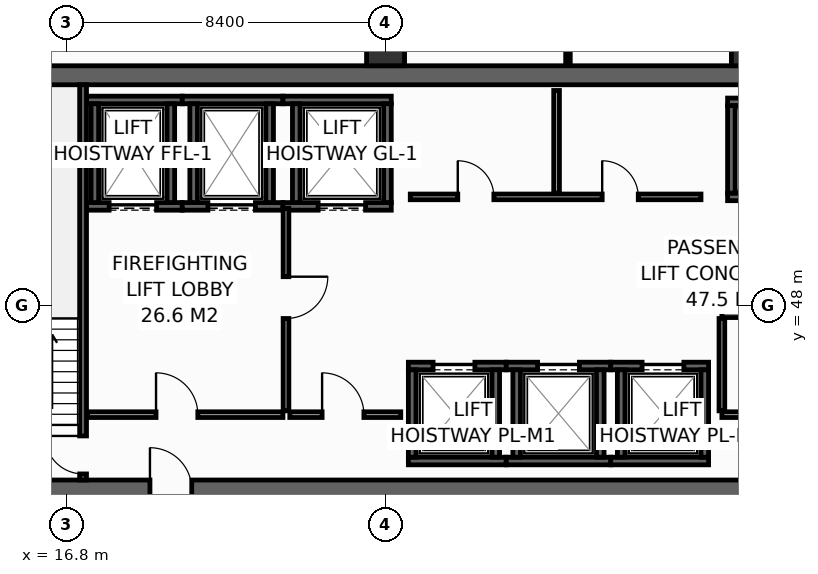
"""IFC4 building model, lengths in metres.
Left out: names, types, materials, properties, quantities, classifications, styles, units other than length and angle.
Written with IfcOpenShell. Run it as: python <this file> out.ifc"""

import sys

from ifc_helpers import new_model, si_unit, direction, frame, frame_2d, origin, origin_2d, place, context, subcontext, project, spatial, rectangle, hollow_rectangle, extrude, element, fill, save


model = new_model("IFC4")
c1 = context("Model", 3, precision=1e-05, world=origin(), true_north=direction((0.0, 1.0)))
c2 = subcontext(c1, "Body", "Model", "MODEL_VIEW")
j1 = project(units=[si_unit("LENGTHUNIT", "METRE"), si_unit("PLANEANGLEUNIT", "RADIAN")], contexts=[c1])
p1 = place(None, origin())
s1 = spatial("IfcSite", under=j1, at=p1, CompositionType="ELEMENT")
p2 = place(p1, origin())
s2 = spatial("IfcBuilding", under=s1, at=p2, CompositionType="ELEMENT")
p3 = place(p2, frame((0.0, 0.0, 179.0)))
s3 = spatial("IfcBuildingStorey", under=s2, at=p3, CompositionType="ELEMENT", Elevation=179.0)
p4 = place(p3, frame((13.6, 43.15, 0.0), z_axis=(0.0, 0.0, 1.0), x_axis=(1.0, 0.0, 0.0)))
e1 = element("IfcWall", 1, at=p4, inside=s3, PredefinedType="SHEAR", context=c2, shape_type="SweptSolid", body=[
    extrude(rectangle(XDim=32.7, YDim=0.5, at=frame_2d((16.35, 0.0))), origin(), (0.0, 0.0, 1.0), 3.55),
])
p5 = place(p4, frame((5.4, 0.0, 0.0)))
e2 = element("IfcOpeningElement", 2, at=p5, cuts=e1, PredefinedType="OPENING", context=c2, shape_type="SweptSolid", body=[
    extrude(rectangle(XDim=1.1, YDim=2.15, at=frame_2d((0.55, 1.075))), frame((0.0, 0.26, 0.0), z_axis=(0.0, -1.0, 0.0), x_axis=(1.0, 0.0, 0.0)), (0.0, 0.0, 1.0), 0.52),
])
p6 = place(p4, frame((25.6, 0.0, 0.0)))
e3 = element("IfcOpeningElement", 3, at=p6, cuts=e1, PredefinedType="OPENING", context=c2, shape_type="SweptSolid", body=[
    extrude(rectangle(XDim=1.1, YDim=2.15, at=frame_2d((0.55, 1.075))), frame((0.0, 0.26, 0.0), z_axis=(0.0, -1.0, 0.0), x_axis=(1.0, 0.0, 0.0)), (0.0, 0.0, 1.0), 0.52),
])
p7 = place(p3, frame((13.6, 54.05, 0.0), z_axis=(0.0, 0.0, 1.0), x_axis=(1.0, 0.0, 0.0)))
e4 = element("IfcWall", 4, at=p7, inside=s3, PredefinedType="SHEAR", context=c2, shape_type="SweptSolid", body=[
    extrude(rectangle(XDim=32.7, YDim=0.5, at=frame_2d((16.35, 0.0))), origin(), (0.0, 0.0, 1.0), 3.55),
])
for number, where, z_axis, x_axis in (
    (5, (25.2, 54.8, 0.0), (0.0, 0.0, 1.0), (1.0, 0.0, 0.0)),
    (6, (34.8, 54.8, 0.0), (0.0, 0.0, 1.0), (1.0, 0.0, 0.0)),
):
    element("IfcColumn", number, at=place(p3, frame(where, z_axis=z_axis, x_axis=x_axis)), inside=s3, PredefinedType="COLUMN", context=c2, shape_type="SweptSolid", body=[
        extrude(hollow_rectangle(XDim=1.0, YDim=1.0, WallThickness=0.045, at=origin_2d()), origin(), (0.0, 0.0, 1.0), 3.8),
    ])
p8 = place(p3, frame((17.33, 50.6, 0.0), z_axis=(0.0, 0.0, 1.0), x_axis=(1.0, 0.0, 0.0)))
e7 = element("IfcWall", 7, at=p8, inside=s3, PredefinedType="SHEAR", context=c2, shape_type="SweptSolid", body=[
    extrude(rectangle(XDim=2.52, YDim=0.2, at=frame_2d((1.26, 0.0))), origin(), (0.0, 0.0, 1.0), 3.55),
])
p9 = place(p8, frame((0.595, 0.0, 0.0)))
e8 = element("IfcOpeningElement", 8, at=p9, cuts=e7, PredefinedType="OPENING", context=c2, shape_type="SweptSolid", body=[
    extrude(rectangle(XDim=1.25, YDim=2.3, at=frame_2d((0.625, 1.15))), frame((0.0, 0.11, 0.0), z_axis=(0.0, -1.0, 0.0), x_axis=(1.0, 0.0, 0.0)), (0.0, 0.0, 1.0), 0.22),
])
p10 = place(p3, frame((17.33, 53.4, 0.0), z_axis=(0.0, 0.0, 1.0), x_axis=(1.0, 0.0, 0.0)))
e9 = element("IfcWall", 9, at=p10, inside=s3, PredefinedType="SHEAR", context=c2, shape_type="SweptSolid", body=[
    extrude(rectangle(XDim=2.52, YDim=0.2, at=frame_2d((1.26, 0.0))), origin(), (0.0, 0.0, 1.0), 3.55),
])
for number, where, z_axis, x_axis in (
    (10, (17.55, 50.7, 0.0), (0.0, 0.0, 1.0), (0.0, 1.0, 0.0)),
    (11, (19.55, 50.7, 0.0), (0.0, 0.0, 1.0), (0.0, 1.0, 0.0)),
):
    element("IfcWall", number, at=place(p3, frame(where, z_axis=z_axis, x_axis=x_axis)), inside=s3, PredefinedType="SHEAR", context=c2, shape_type="SweptSolid", body=[
        extrude(rectangle(XDim=2.6, YDim=0.2, at=frame_2d((1.3, 0.0))), origin(), (0.0, 0.0, 1.0), 3.55),
    ])
p11 = place(p3, frame((19.85, 50.6, 0.0), z_axis=(0.0, 0.0, 1.0), x_axis=(1.0, 0.0, 0.0)))
e12 = element("IfcWall", 12, at=p11, inside=s3, PredefinedType="SHEAR", context=c2, shape_type="SweptSolid", body=[
    extrude(rectangle(XDim=2.65, YDim=0.2, at=frame_2d((1.325, 0.0))), origin(), (0.0, 0.0, 1.0), 3.55),
])
p12 = place(p11, frame((0.675, 0.0, 0.0)))
e13 = element("IfcOpeningElement", 13, at=p12, cuts=e12, PredefinedType="OPENING", context=c2, shape_type="SweptSolid", body=[
    extrude(rectangle(XDim=1.25, YDim=2.3, at=frame_2d((0.625, 1.15))), frame((0.0, 0.11, 0.0), z_axis=(0.0, -1.0, 0.0), x_axis=(1.0, 0.0, 0.0)), (0.0, 0.0, 1.0), 0.22),
])
p13 = place(p3, frame((19.85, 53.4, 0.0), z_axis=(0.0, 0.0, 1.0), x_axis=(1.0, 0.0, 0.0)))
e14 = element("IfcWall", 14, at=p13, inside=s3, PredefinedType="SHEAR", context=c2, shape_type="SweptSolid", body=[
    extrude(rectangle(XDim=2.65, YDim=0.2, at=frame_2d((1.325, 0.0))), origin(), (0.0, 0.0, 1.0), 3.55),
])
for number, where, z_axis, x_axis in (
    (15, (20.15, 50.7, 0.0), (0.0, 0.0, 1.0), (0.0, 1.0, 0.0)),
    (16, (22.15, 50.7, 0.0), (0.0, 0.0, 1.0), (0.0, 1.0, 0.0)),
):
    element("IfcWall", number, at=place(p3, frame(where, z_axis=z_axis, x_axis=x_axis)), inside=s3, PredefinedType="SHEAR", context=c2, shape_type="SweptSolid", body=[
        extrude(rectangle(XDim=2.6, YDim=0.2, at=frame_2d((1.3, 0.0))), origin(), (0.0, 0.0, 1.0), 3.55),
    ])
p14 = place(p3, frame((22.5, 50.6, 0.0), z_axis=(0.0, 0.0, 1.0), x_axis=(1.0, 0.0, 0.0)))
e17 = element("IfcWall", 17, at=p14, inside=s3, PredefinedType="SHEAR", context=c2, shape_type="SweptSolid", body=[
    extrude(rectangle(XDim=2.85, YDim=0.2, at=frame_2d((1.425, 0.0))), origin(), (0.0, 0.0, 1.0), 3.55),
])
p15 = place(p14, frame((0.925, 0.0, 0.0)))
e18 = element("IfcOpeningElement", 18, at=p15, cuts=e17, PredefinedType="OPENING", context=c2, shape_type="SweptSolid", body=[
    extrude(rectangle(XDim=1.25, YDim=2.3, at=frame_2d((0.625, 1.15))), frame((0.0, 0.11, 0.0), z_axis=(0.0, -1.0, 0.0), x_axis=(1.0, 0.0, 0.0)), (0.0, 0.0, 1.0), 0.22),
])
p16 = place(p3, frame((22.5, 53.4, 0.0), z_axis=(0.0, 0.0, 1.0), x_axis=(1.0, 0.0, 0.0)))
e19 = element("IfcWall", 19, at=p16, inside=s3, PredefinedType="SHEAR", context=c2, shape_type="SweptSolid", body=[
    extrude(rectangle(XDim=2.85, YDim=0.2, at=frame_2d((1.425, 0.0))), origin(), (0.0, 0.0, 1.0), 3.55),
])
for number, where, z_axis, x_axis in (
    (20, (22.85, 50.7, 0.0), (0.0, 0.0, 1.0), (0.0, 1.0, 0.0)),
    (21, (25.25, 50.7, 0.0), (0.0, 0.0, 1.0), (0.0, 1.0, 0.0)),
):
    element("IfcWall", number, at=place(p3, frame(where, z_axis=z_axis, x_axis=x_axis)), inside=s3, PredefinedType="SHEAR", context=c2, shape_type="SweptSolid", body=[
        extrude(rectangle(XDim=2.6, YDim=0.2, at=frame_2d((1.3, 0.0))), origin(), (0.0, 0.0, 1.0), 3.55),
    ])
p17 = place(p3, frame((25.8, 43.9, 0.0), z_axis=(0.0, 0.0, 1.0), x_axis=(1.0, 0.0, 0.0)))
e22 = element("IfcWall", 22, at=p17, inside=s3, PredefinedType="SHEAR", context=c2, shape_type="SweptSolid", body=[
    extrude(rectangle(XDim=2.575, YDim=0.2, at=frame_2d((1.288, 0.0))), origin(), (0.0, 0.0, 1.0), 3.55),
])
p18 = place(p3, frame((25.8, 46.4, 0.0), z_axis=(0.0, 0.0, 1.0), x_axis=(1.0, 0.0, 0.0)))
e23 = element("IfcWall", 23, at=p18, inside=s3, PredefinedType="SHEAR", context=c2, shape_type="SweptSolid", body=[
    extrude(rectangle(XDim=2.575, YDim=0.2, at=frame_2d((1.288, 0.0))), origin(), (0.0, 0.0, 1.0), 3.55),
])
p19 = place(p18, frame((0.65, 0.0, 0.0)))
e24 = element("IfcOpeningElement", 24, at=p19, cuts=e23, PredefinedType="OPENING", context=c2, shape_type="SweptSolid", body=[
    extrude(rectangle(XDim=1.1, YDim=2.2, at=frame_2d((0.55, 1.1))), frame((0.0, 0.11, 0.0), z_axis=(0.0, -1.0, 0.0), x_axis=(1.0, 0.0, 0.0)), (0.0, 0.0, 1.0), 0.22),
])
for number, where, z_axis, x_axis in (
    (25, (25.9, 44.0, 0.0), (0.0, 0.0, 1.0), (0.0, 1.0, 0.0)),
    (26, (28.1, 44.0, 0.0), (0.0, 0.0, 1.0), (0.0, 1.0, 0.0)),
):
    element("IfcWall", number, at=place(p3, frame(where, z_axis=z_axis, x_axis=x_axis)), inside=s3, PredefinedType="SHEAR", context=c2, shape_type="SweptSolid", body=[
        extrude(rectangle(XDim=2.3, YDim=0.2, at=frame_2d((1.15, 0.0))), origin(), (0.0, 0.0, 1.0), 3.55),
    ])
p20 = place(p3, frame((28.375, 43.9, 0.0), z_axis=(0.0, 0.0, 1.0), x_axis=(1.0, 0.0, 0.0)))
e27 = element("IfcWall", 27, at=p20, inside=s3, PredefinedType="SHEAR", context=c2, shape_type="SweptSolid", body=[
    extrude(rectangle(XDim=2.75, YDim=0.2, at=frame_2d((1.375, 0.0))), origin(), (0.0, 0.0, 1.0), 3.55),
])
p21 = place(p3, frame((28.375, 46.4, 0.0), z_axis=(0.0, 0.0, 1.0), x_axis=(1.0, 0.0, 0.0)))
e28 = element("IfcWall", 28, at=p21, inside=s3, PredefinedType="SHEAR", context=c2, shape_type="SweptSolid", body=[
    extrude(rectangle(XDim=2.75, YDim=0.2, at=frame_2d((1.375, 0.0))), origin(), (0.0, 0.0, 1.0), 3.55),
])
p22 = place(p21, frame((0.825, 0.0, 0.0)))
e29 = element("IfcOpeningElement", 29, at=p22, cuts=e28, PredefinedType="OPENING", context=c2, shape_type="SweptSolid", body=[
    extrude(rectangle(XDim=1.1, YDim=2.2, at=frame_2d((0.55, 1.1))), frame((0.0, 0.11, 0.0), z_axis=(0.0, -1.0, 0.0), x_axis=(1.0, 0.0, 0.0)), (0.0, 0.0, 1.0), 0.22),
])
for number, where, z_axis, x_axis in (
    (30, (28.65, 44.0, 0.0), (0.0, 0.0, 1.0), (0.0, 1.0, 0.0)),
    (31, (30.85, 44.0, 0.0), (0.0, 0.0, 1.0), (0.0, 1.0, 0.0)),
):
    element("IfcWall", number, at=place(p3, frame(where, z_axis=z_axis, x_axis=x_axis)), inside=s3, PredefinedType="SHEAR", context=c2, shape_type="SweptSolid", body=[
        extrude(rectangle(XDim=2.3, YDim=0.2, at=frame_2d((1.15, 0.0))), origin(), (0.0, 0.0, 1.0), 3.55),
    ])
p23 = place(p3, frame((31.125, 43.9, 0.0), z_axis=(0.0, 0.0, 1.0), x_axis=(1.0, 0.0, 0.0)))
e32 = element("IfcWall", 32, at=p23, inside=s3, PredefinedType="SHEAR", context=c2, shape_type="SweptSolid", body=[
    extrude(rectangle(XDim=2.575, YDim=0.2, at=frame_2d((1.288, 0.0))), origin(), (0.0, 0.0, 1.0), 3.55),
])
p24 = place(p3, frame((31.125, 46.4, 0.0), z_axis=(0.0, 0.0, 1.0), x_axis=(1.0, 0.0, 0.0)))
e33 = element("IfcWall", 33, at=p24, inside=s3, PredefinedType="SHEAR", context=c2, shape_type="SweptSolid", body=[
    extrude(rectangle(XDim=2.575, YDim=0.2, at=frame_2d((1.288, 0.0))), origin(), (0.0, 0.0, 1.0), 3.55),
])
p25 = place(p24, frame((0.825, 0.0, 0.0)))
e34 = element("IfcOpeningElement", 34, at=p25, cuts=e33, PredefinedType="OPENING", context=c2, shape_type="SweptSolid", body=[
    extrude(rectangle(XDim=1.1, YDim=2.2, at=frame_2d((0.55, 1.1))), frame((0.0, 0.11, 0.0), z_axis=(0.0, -1.0, 0.0), x_axis=(1.0, 0.0, 0.0)), (0.0, 0.0, 1.0), 0.22),
])
for number, where, z_axis, x_axis in (
    (35, (31.4, 44.0, 0.0), (0.0, 0.0, 1.0), (0.0, 1.0, 0.0)),
    (36, (33.6, 44.0, 0.0), (0.0, 0.0, 1.0), (0.0, 1.0, 0.0)),
):
    element("IfcWall", number, at=place(p3, frame(where, z_axis=z_axis, x_axis=x_axis)), inside=s3, PredefinedType="SHEAR", context=c2, shape_type="SweptSolid", body=[
        extrude(rectangle(XDim=2.3, YDim=0.2, at=frame_2d((1.15, 0.0))), origin(), (0.0, 0.0, 1.0), 3.55),
    ])
for number, where, z_axis, x_axis in (
    (37, (34.2, 50.85, 0.0), (0.0, 0.0, 1.0), (1.0, 0.0, 0.0)),
    (38, (34.2, 53.35, 0.0), (0.0, 0.0, 1.0), (1.0, 0.0, 0.0)),
):
    element("IfcWall", number, at=place(p3, frame(where, z_axis=z_axis, x_axis=x_axis)), inside=s3, PredefinedType="SHEAR", context=c2, shape_type="SweptSolid", body=[
        extrude(rectangle(XDim=2.575, YDim=0.2, at=frame_2d((1.288, 0.0))), origin(), (0.0, 0.0, 1.0), 3.55),
    ])
p26 = place(p3, frame((34.3, 50.95, 0.0), z_axis=(0.0, 0.0, 1.0), x_axis=(0.0, 1.0, 0.0)))
e39 = element("IfcWall", 39, at=p26, inside=s3, PredefinedType="SHEAR", context=c2, shape_type="SweptSolid", body=[
    extrude(rectangle(XDim=2.3, YDim=0.2, at=frame_2d((1.15, 0.0))), origin(), (0.0, 0.0, 1.0), 3.55),
])
p27 = place(p3, frame((17.24, 43.4, 0.0), z_axis=(0.0, 0.0, 1.0), x_axis=(0.0, 1.0, 0.0)))
e40 = element("IfcWall", 40, at=p27, inside=s3, PredefinedType="SHEAR", context=c2, shape_type="SweptSolid", body=[
    extrude(rectangle(XDim=10.4, YDim=0.18, at=frame_2d((5.2, 0.0))), origin(), (0.0, 0.0, 1.0), 3.55),
])
p28 = place(p27, frame((0.16, 0.0, 0.0)))
e41 = element("IfcOpeningElement", 41, at=p28, cuts=e40, PredefinedType="OPENING", context=c2, shape_type="SweptSolid", body=[
    extrude(rectangle(XDim=1.0, YDim=2.15, at=frame_2d((0.5, 1.075))), frame((0.0, 0.1, 0.0), z_axis=(0.0, -1.0, 0.0), x_axis=(1.0, 0.0, 0.0)), (0.0, 0.0, 1.0), 0.2),
])
p29 = place(p3, frame((17.36, 45.12, 0.0), z_axis=(0.0, 0.0, 1.0), x_axis=(1.0, 0.0, 0.0)))
e42 = element("IfcWall", 42, at=p29, inside=s3, PredefinedType="PARTITIONING", context=c2, shape_type="SweptSolid", body=[
    extrude(rectangle(XDim=5.14, YDim=0.15, at=frame_2d((2.57, 0.0))), origin(), (0.0, 0.0, 1.0), 3.55),
])
p30 = place(p29, frame((1.8, 0.0, 0.0)))
e43 = element("IfcOpeningElement", 43, at=p30, cuts=e42, PredefinedType="OPENING", context=c2, shape_type="SweptSolid", body=[
    extrude(rectangle(XDim=1.1, YDim=2.15, at=frame_2d((0.55, 1.075))), frame((0.0, 0.085, 0.0), z_axis=(0.0, -1.0, 0.0), x_axis=(1.0, 0.0, 0.0)), (0.0, 0.0, 1.0), 0.17),
])
p31 = place(p3, frame((22.58, 50.55, 0.0), z_axis=(0.0, 0.0, 1.0), x_axis=(0.0, -1.0, 0.0)))
e44 = element("IfcWall", 44, at=p31, inside=s3, PredefinedType="PARTITIONING", context=c2, shape_type="SweptSolid", body=[
    extrude(rectangle(XDim=5.33, YDim=0.15, at=frame_2d((2.665, 0.0))), origin(), (0.0, 0.0, 1.0), 3.55),
])
p32 = place(p31, frame((1.8, 0.0, 0.0)))
e45 = element("IfcOpeningElement", 45, at=p32, cuts=e44, PredefinedType="OPENING", context=c2, shape_type="SweptSolid", body=[
    extrude(rectangle(XDim=1.1, YDim=2.15, at=frame_2d((0.55, 1.075))), frame((0.0, 0.085, 0.0), z_axis=(0.0, -1.0, 0.0), x_axis=(1.0, 0.0, 0.0)), (0.0, 0.0, 1.0), 0.17),
])
p33 = place(p3, frame((22.68, 45.12, 0.0), z_axis=(0.0, 0.0, 1.0), x_axis=(1.0, 0.0, 0.0)))
e46 = element("IfcWall", 46, at=p33, inside=s3, PredefinedType="PARTITIONING", context=c2, shape_type="SweptSolid", body=[
    extrude(rectangle(XDim=2.92, YDim=0.15, at=frame_2d((1.46, 0.0))), origin(), (0.0, 0.0, 1.0), 3.55),
])
p34 = place(p33, frame((0.85, 0.0, 0.0)))
e47 = element("IfcOpeningElement", 47, at=p34, cuts=e46, PredefinedType="OPENING", context=c2, shape_type="SweptSolid", body=[
    extrude(rectangle(XDim=1.1, YDim=2.15, at=frame_2d((0.55, 1.075))), frame((0.0, 0.085, 0.0), z_axis=(0.0, -1.0, 0.0), x_axis=(1.0, 0.0, 0.0)), (0.0, 0.0, 1.0), 0.17),
])
p35 = place(p3, frame((34.05, 45.12, 0.0), z_axis=(0.0, 0.0, 1.0), x_axis=(1.0, 0.0, 0.0)))
e48 = element("IfcWall", 48, at=p35, inside=s3, PredefinedType="PARTITIONING", context=c2, shape_type="SweptSolid", body=[
    extrude(rectangle(XDim=8.45, YDim=0.15, at=frame_2d((4.225, 0.0))), origin(), (0.0, 0.0, 1.0), 3.55),
])
p36 = place(p35, frame((3.6, 0.0, 0.0)))
e49 = element("IfcOpeningElement", 49, at=p36, cuts=e48, PredefinedType="OPENING", context=c2, shape_type="SweptSolid", body=[
    extrude(rectangle(XDim=0.95, YDim=2.15, at=frame_2d((0.475, 1.075))), frame((0.0, 0.085, 0.0), z_axis=(0.0, -1.0, 0.0), x_axis=(1.0, 0.0, 0.0)), (0.0, 0.0, 1.0), 0.17),
])
p37 = place(p3, frame((34.05, 47.75, 0.0), z_axis=(0.0, 0.0, 1.0), x_axis=(1.0, 0.0, 0.0)))
e50 = element("IfcWall", 50, at=p37, inside=s3, PredefinedType="PARTITIONING", context=c2, shape_type="SweptSolid", body=[
    extrude(rectangle(XDim=8.45, YDim=0.15, at=frame_2d((4.225, 0.0))), origin(), (0.0, 0.0, 1.0), 3.55),
])
p38 = place(p3, frame((34.05, 45.22, 0.0), z_axis=(0.0, 0.0, 1.0), x_axis=(0.0, 1.0, 0.0)))
e51 = element("IfcWall", 51, at=p38, inside=s3, PredefinedType="PARTITIONING", context=c2, shape_type="SweptSolid", body=[
    extrude(rectangle(XDim=2.43, YDim=0.15, at=frame_2d((1.215, 0.0))), origin(), (0.0, 0.0, 1.0), 3.55),
])
p39 = place(p3, frame((25.85, 50.85, 0.0), z_axis=(0.0, 0.0, 1.0), x_axis=(1.0, 0.0, 0.0)))
e52 = element("IfcWall", 52, at=p39, inside=s3, PredefinedType="PARTITIONING", context=c2, shape_type="SweptSolid", body=[
    extrude(rectangle(XDim=7.65, YDim=0.15, at=frame_2d((3.825, 0.0))), origin(), (0.0, 0.0, 1.0), 3.55),
])
p40 = place(p39, frame((1.25, 0.0, 0.0)))
e53 = element("IfcOpeningElement", 53, at=p40, cuts=e52, PredefinedType="OPENING", context=c2, shape_type="SweptSolid", body=[
    extrude(rectangle(XDim=0.95, YDim=2.15, at=frame_2d((0.475, 1.075))), frame((0.0, 0.085, 0.0), z_axis=(0.0, -1.0, 0.0), x_axis=(1.0, 0.0, 0.0)), (0.0, 0.0, 1.0), 0.17),
])
p41 = place(p39, frame((5.05, 0.0, 0.0)))
e54 = element("IfcOpeningElement", 54, at=p41, cuts=e52, PredefinedType="OPENING", context=c2, shape_type="SweptSolid", body=[
    extrude(rectangle(XDim=0.95, YDim=2.15, at=frame_2d((0.475, 1.075))), frame((0.0, 0.085, 0.0), z_axis=(0.0, -1.0, 0.0), x_axis=(1.0, 0.0, 0.0)), (0.0, 0.0, 1.0), 0.17),
])
p42 = place(p3, frame((29.7, 50.95, 0.0), z_axis=(0.0, 0.0, 1.0), x_axis=(0.0, 1.0, 0.0)))
e55 = element("IfcWall", 55, at=p42, inside=s3, PredefinedType="PARTITIONING", context=c2, shape_type="SweptSolid", body=[
    extrude(rectangle(XDim=2.7, YDim=0.15, at=frame_2d((1.35, 0.0))), origin(), (0.0, 0.0, 1.0), 3.55),
])
p43 = place(p3, frame((30.0, 54.32, 0.0), z_axis=(0.0, 0.0, 1.0), x_axis=(0.0, 1.0, 0.0)))
e56 = element("IfcWall", 56, at=p43, inside=s3, PredefinedType="PARTITIONING", context=c2, shape_type="SweptSolid", body=[
    extrude(rectangle(XDim=1.675, YDim=0.12, at=frame_2d((0.837, 0.0))), origin(), (0.0, 0.0, 1.0), 2.935),
])
p44 = place(p9, origin())
e57 = element("IfcDoor", 57, at=p44, inside=s3, OperationType="SLIDING_TO_LEFT", PredefinedType="DOOR", context=c2, shape_type="SweptSolid", body=[
    extrude(rectangle(XDim=1.25, YDim=2.3, at=frame_2d((0.625, 1.15))), frame((0.0, 0.025, 0.0), z_axis=(0.0, -1.0, 0.0), x_axis=(1.0, 0.0, 0.0)), (0.0, 0.0, 1.0), 0.05),
])
fill(e8, e57)
p45 = place(p12, origin())
e58 = element("IfcDoor", 58, at=p45, inside=s3, OperationType="SLIDING_TO_LEFT", PredefinedType="DOOR", context=c2, shape_type="SweptSolid", body=[
    extrude(rectangle(XDim=1.25, YDim=2.3, at=frame_2d((0.625, 1.15))), frame((0.0, 0.025, 0.0), z_axis=(0.0, -1.0, 0.0), x_axis=(1.0, 0.0, 0.0)), (0.0, 0.0, 1.0), 0.05),
])
fill(e13, e58)
p46 = place(p15, origin())
e59 = element("IfcDoor", 59, at=p46, inside=s3, OperationType="SLIDING_TO_LEFT", PredefinedType="DOOR", context=c2, shape_type="SweptSolid", body=[
    extrude(rectangle(XDim=1.25, YDim=2.3, at=frame_2d((0.625, 1.15))), frame((0.0, 0.025, 0.0), z_axis=(0.0, -1.0, 0.0), x_axis=(1.0, 0.0, 0.0)), (0.0, 0.0, 1.0), 0.05),
])
fill(e18, e59)
p47 = place(p19, origin())
e60 = element("IfcDoor", 60, at=p47, inside=s3, OperationType="SLIDING_TO_LEFT", PredefinedType="DOOR", context=c2, shape_type="SweptSolid", body=[
    extrude(rectangle(XDim=1.1, YDim=2.2, at=frame_2d((0.55, 1.1))), frame((0.0, 0.025, 0.0), z_axis=(0.0, -1.0, 0.0), x_axis=(1.0, 0.0, 0.0)), (0.0, 0.0, 1.0), 0.05),
])
fill(e24, e60)
p48 = place(p22, origin())
e61 = element("IfcDoor", 61, at=p48, inside=s3, OperationType="SLIDING_TO_LEFT", PredefinedType="DOOR", context=c2, shape_type="SweptSolid", body=[
    extrude(rectangle(XDim=1.1, YDim=2.2, at=frame_2d((0.55, 1.1))), frame((0.0, 0.025, 0.0), z_axis=(0.0, -1.0, 0.0), x_axis=(1.0, 0.0, 0.0)), (0.0, 0.0, 1.0), 0.05),
])
fill(e29, e61)
p49 = place(p25, origin())
e62 = element("IfcDoor", 62, at=p49, inside=s3, OperationType="SLIDING_TO_LEFT", PredefinedType="DOOR", context=c2, shape_type="SweptSolid", body=[
    extrude(rectangle(XDim=1.1, YDim=2.2, at=frame_2d((0.55, 1.1))), frame((0.0, 0.025, 0.0), z_axis=(0.0, -1.0, 0.0), x_axis=(1.0, 0.0, 0.0)), (0.0, 0.0, 1.0), 0.05),
])
fill(e34, e62)
p50 = place(p28, origin())
e63 = element("IfcDoor", 63, at=p50, inside=s3, OperationType="SINGLE_SWING_RIGHT", PredefinedType="DOOR", context=c2, shape_type="SweptSolid", body=[
    extrude(rectangle(XDim=1.0, YDim=2.15, at=frame_2d((0.5, 1.075))), frame((0.0, 0.025, 0.0), z_axis=(0.0, -1.0, 0.0), x_axis=(1.0, 0.0, 0.0)), (0.0, 0.0, 1.0), 0.05),
])
fill(e41, e63)
p51 = place(p30, origin())
e64 = element("IfcDoor", 64, at=p51, inside=s3, OperationType="SINGLE_SWING_LEFT", PredefinedType="DOOR", context=c2, shape_type="SweptSolid", body=[
    extrude(rectangle(XDim=1.1, YDim=2.15, at=frame_2d((0.55, 1.075))), frame((0.0, 0.025, 0.0), z_axis=(0.0, -1.0, 0.0), x_axis=(1.0, 0.0, 0.0)), (0.0, 0.0, 1.0), 0.05),
])
fill(e43, e64)
p52 = place(p32, origin())
e65 = element("IfcDoor", 65, at=p52, inside=s3, OperationType="SINGLE_SWING_LEFT", PredefinedType="DOOR", context=c2, shape_type="SweptSolid", body=[
    extrude(rectangle(XDim=1.1, YDim=2.15, at=frame_2d((0.55, 1.075))), frame((0.0, 0.025, 0.0), z_axis=(0.0, -1.0, 0.0), x_axis=(1.0, 0.0, 0.0)), (0.0, 0.0, 1.0), 0.05),
])
fill(e45, e65)
p53 = place(p34, origin())
e66 = element("IfcDoor", 66, at=p53, inside=s3, OperationType="SINGLE_SWING_LEFT", PredefinedType="DOOR", context=c2, shape_type="SweptSolid", body=[
    extrude(rectangle(XDim=1.1, YDim=2.15, at=frame_2d((0.55, 1.075))), frame((0.0, 0.025, 0.0), z_axis=(0.0, -1.0, 0.0), x_axis=(1.0, 0.0, 0.0)), (0.0, 0.0, 1.0), 0.05),
])
fill(e47, e66)
p54 = place(p5, origin())
e67 = element("IfcDoor", 67, at=p54, inside=s3, OperationType="SINGLE_SWING_LEFT", PredefinedType="DOOR", context=c2, shape_type="SweptSolid", body=[
    extrude(rectangle(XDim=1.1, YDim=2.15, at=frame_2d((0.55, 1.075))), frame((0.0, 0.025, 0.0), z_axis=(0.0, -1.0, 0.0), x_axis=(1.0, 0.0, 0.0)), (0.0, 0.0, 1.0), 0.05),
])
fill(e2, e67)
p55 = place(p40, origin())
e68 = element("IfcDoor", 68, at=p55, inside=s3, OperationType="SINGLE_SWING_LEFT", PredefinedType="DOOR", context=c2, shape_type="SweptSolid", body=[
    extrude(rectangle(XDim=0.95, YDim=2.15, at=frame_2d((0.475, 1.075))), frame((0.0, 0.025, 0.0), z_axis=(0.0, -1.0, 0.0), x_axis=(1.0, 0.0, 0.0)), (0.0, 0.0, 1.0), 0.05),
])
fill(e53, e68)
p56 = place(p41, origin())
e69 = element("IfcDoor", 69, at=p56, inside=s3, OperationType="SINGLE_SWING_LEFT", PredefinedType="DOOR", context=c2, shape_type="SweptSolid", body=[
    extrude(rectangle(XDim=0.95, YDim=2.15, at=frame_2d((0.475, 1.075))), frame((0.0, 0.025, 0.0), z_axis=(0.0, -1.0, 0.0), x_axis=(1.0, 0.0, 0.0)), (0.0, 0.0, 1.0), 0.05),
])
fill(e54, e69)
save(model, sys.argv[1])
